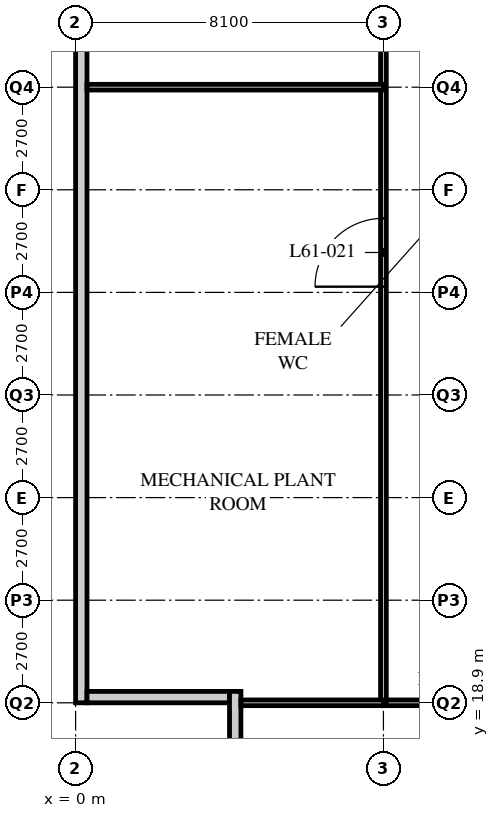
"""IFC4 building model, lengths in metres.
Left out: names, types, materials, properties, quantities, classifications, styles, units other than length and angle.
Written with IfcOpenShell. Run it as: python <this file> out.ifc"""

import sys

from ifc_helpers import new_model, si_unit, direction, frame, frame_2d, origin, place, context, subcontext, project, spatial, rectangle, extrude, element, fill, save


model = new_model("IFC4")
c1 = context("Model", 3, precision=1e-05, world=origin(), true_north=direction((0.0, 1.0)))
c2 = subcontext(c1, "Body", "Model", "MODEL_VIEW")
j1 = project(units=[si_unit("LENGTHUNIT", "METRE"), si_unit("PLANEANGLEUNIT", "RADIAN")], contexts=[c1])
p1 = place(None, origin())
s1 = spatial("IfcSite", under=j1, at=p1, CompositionType="ELEMENT")
p2 = place(p1, origin())
s2 = spatial("IfcBuilding", under=s1, at=p2, CompositionType="ELEMENT")
p3 = place(p2, frame((0.0, 0.0, 235.2)))
s3 = spatial("IfcBuildingStorey", under=s2, at=p3, CompositionType="ELEMENT", Elevation=235.2)
p4 = place(p3, frame((0.15, 51.0, 0.0), z_axis=(0.0, 0.0, 1.0), x_axis=(0.0, -1.0, 0.0)))
e1 = element("IfcWall", 1, at=p4, inside=s3, PredefinedType="SOLIDWALL", context=c2, shape_type="SweptSolid", body=[
    extrude(rectangle(XDim=32.1, YDim=0.3, at=frame_2d((16.05, 0.0))), origin(), (0.0, 0.0, 1.0), 5.95),
])
p5 = place(p3, frame((0.3, 19.05, 0.0), z_axis=(0.0, 0.0, 1.0), x_axis=(1.0, 0.0, 0.0)))
e2 = element("IfcWall", 2, at=p5, inside=s3, PredefinedType="SOLIDWALL", context=c2, shape_type="SweptSolid", body=[
    extrude(rectangle(XDim=3.75, YDim=0.3, at=frame_2d((1.875, 0.0))), origin(), (0.0, 0.0, 1.0), 5.95),
])
p6 = place(p3, frame((4.2, 19.2, 0.0), z_axis=(0.0, 0.0, 1.0), x_axis=(0.0, -1.0, 0.0)))
e3 = element("IfcWall", 3, at=p6, inside=s3, PredefinedType="SOLIDWALL", context=c2, shape_type="SweptSolid", body=[
    extrude(rectangle(XDim=4.35, YDim=0.3, at=frame_2d((2.175, 0.0))), origin(), (0.0, 0.0, 1.0), 6.25),
])
p7 = place(p3, frame((8.1, 18.9, 0.0), z_axis=(0.0, 0.0, 1.0), x_axis=(1.0, 0.0, 0.0)))
e4 = element("IfcWall", 4, at=p7, inside=s3, PredefinedType="PARTITIONING", context=c2, shape_type="SweptSolid", body=[
    extrude(rectangle(XDim=40.5, YDim=0.15, at=frame_2d((20.25, 0.0))), origin(), (0.0, 0.0, 1.0), 5.95),
])
p8 = place(p7, frame((11.25, 0.0, 0.0)))
e5 = element("IfcOpeningElement", 5, at=p8, cuts=e4, PredefinedType="OPENING", context=c2, shape_type="SweptSolid", body=[
    extrude(rectangle(XDim=1.8, YDim=2.4, at=frame_2d((0.9, 1.2))), frame((0.0, 0.085, 0.0), z_axis=(0.0, -1.0, 0.0), x_axis=(1.0, 0.0, 0.0)), (0.0, 0.0, 1.0), 0.17),
])
p9 = place(p7, frame((27.45, 0.0, 0.0)))
e6 = element("IfcOpeningElement", 6, at=p9, cuts=e4, PredefinedType="OPENING", context=c2, shape_type="SweptSolid", body=[
    extrude(rectangle(XDim=1.8, YDim=2.4, at=frame_2d((0.9, 1.2))), frame((0.0, 0.085, 0.0), z_axis=(0.0, -1.0, 0.0), x_axis=(1.0, 0.0, 0.0)), (0.0, 0.0, 1.0), 0.17),
])
p10 = place(p7, frame((1.275, 0.0, 0.0)))
e7 = element("IfcOpeningElement", 7, at=p10, cuts=e4, PredefinedType="OPENING", context=c2, shape_type="SweptSolid", body=[
    extrude(rectangle(XDim=1.0, YDim=2.1, at=frame_2d((0.5, 1.05))), frame((0.0, 0.085, 0.0), z_axis=(0.0, -1.0, 0.0), x_axis=(1.0, 0.0, 0.0)), (0.0, 0.0, 1.0), 0.17),
])
p11 = place(p7, frame((38.225, 0.0, 0.0)))
e8 = element("IfcOpeningElement", 8, at=p11, cuts=e4, PredefinedType="OPENING", context=c2, shape_type="SweptSolid", body=[
    extrude(rectangle(XDim=1.0, YDim=2.1, at=frame_2d((0.5, 1.05))), frame((0.0, 0.085, 0.0), z_axis=(0.0, -1.0, 0.0), x_axis=(1.0, 0.0, 0.0)), (0.0, 0.0, 1.0), 0.17),
])
p12 = place(p3, frame((8.1, 18.9, 0.0), z_axis=(0.0, 0.0, 1.0), x_axis=(0.0, 1.0, 0.0)))
e9 = element("IfcWall", 9, at=p12, inside=s3, PredefinedType="PARTITIONING", context=c2, shape_type="SweptSolid", body=[
    extrude(rectangle(XDim=32.4, YDim=0.15, at=frame_2d((16.2, 0.0))), origin(), (0.0, 0.0, 1.0), 5.95),
])
p13 = place(p12, frame((10.95, 0.0, 0.0)))
e10 = element("IfcOpeningElement", 10, at=p13, cuts=e9, PredefinedType="OPENING", context=c2, shape_type="SweptSolid", body=[
    extrude(rectangle(XDim=1.8, YDim=2.4, at=frame_2d((0.9, 1.2))), frame((0.0, 0.085, 0.0), z_axis=(0.0, -1.0, 0.0), x_axis=(1.0, 0.0, 0.0)), (0.0, 0.0, 1.0), 0.17),
])
p14 = place(p12, frame((27.15, 0.0, 0.0)))
e11 = element("IfcOpeningElement", 11, at=p14, cuts=e9, PredefinedType="OPENING", context=c2, shape_type="SweptSolid", body=[
    extrude(rectangle(XDim=1.8, YDim=2.4, at=frame_2d((0.9, 1.2))), frame((0.0, 0.085, 0.0), z_axis=(0.0, -1.0, 0.0), x_axis=(1.0, 0.0, 0.0)), (0.0, 0.0, 1.0), 0.17),
])
p15 = place(p3, frame((8.1, 35.1, 0.0), z_axis=(0.0, 0.0, 1.0), x_axis=(-1.0, 0.0, 0.0)))
e12 = element("IfcWall", 12, at=p15, inside=s3, PredefinedType="PARTITIONING", context=c2, shape_type="SweptSolid", body=[
    extrude(rectangle(XDim=7.8, YDim=0.15, at=frame_2d((3.9, 0.0))), origin(), (0.0, 0.0, 1.0), 6.95),
])
p16 = place(p3, frame((4.35, 18.9, 0.0), z_axis=(0.0, 0.0, 1.0), x_axis=(1.0, 0.0, 0.0)))
e13 = element("IfcWall", 13, at=p16, inside=s3, PredefinedType="PARTITIONING", context=c2, shape_type="SweptSolid", body=[
    extrude(rectangle(XDim=3.75, YDim=0.15, at=frame_2d((1.875, 0.0))), origin(), (0.0, 0.0, 1.0), 5.95),
])
p17 = place(p13, origin())
e14 = element("IfcDoor", 14, at=p17, inside=s3, OperationType="DOUBLE_DOOR_SINGLE_SWING", PredefinedType="DOOR", context=c2, shape_type="SweptSolid", body=[
    extrude(rectangle(XDim=1.8, YDim=2.4, at=frame_2d((0.9, 1.2))), frame((0.0, 0.025, 0.0), z_axis=(0.0, -1.0, 0.0), x_axis=(1.0, 0.0, 0.0)), (0.0, 0.0, 1.0), 0.05),
])
fill(e10, e14)
save(model, sys.argv[1])
